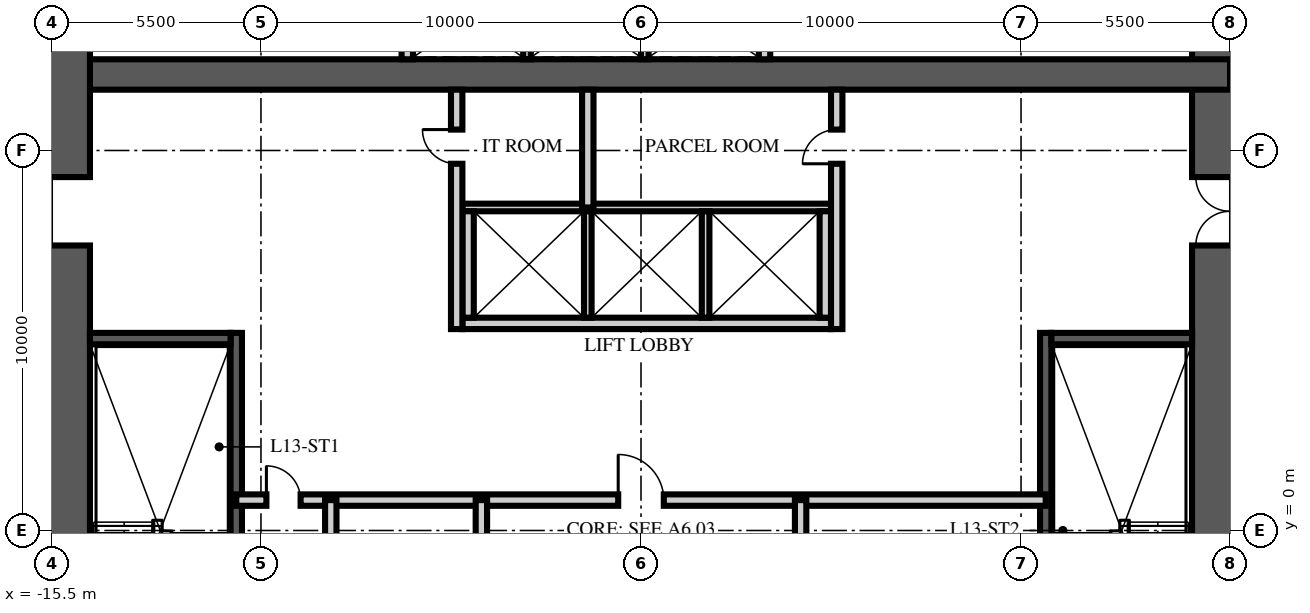
"""IFC4 building model, lengths in metres.
Left out: names, types, materials, properties, quantities, classifications, styles, units other than length and angle.
Written with IfcOpenShell. Run it as: python <this file> out.ifc"""

import sys

from ifc_helpers import new_model, si_unit, direction, frame, frame_2d, origin, place, context, subcontext, project, spatial, rectangle, extrude, element, fill, save


model = new_model("IFC4")
c1 = context("Model", 3, precision=1e-05, world=origin(), true_north=direction((0.0, 1.0)))
c2 = subcontext(c1, "Body", "Model", "MODEL_VIEW")
j1 = project(units=[si_unit("LENGTHUNIT", "METRE"), si_unit("PLANEANGLEUNIT", "RADIAN")], contexts=[c1])
p1 = place(None, origin())
s1 = spatial("IfcSite", under=j1, at=p1, CompositionType="ELEMENT")
p2 = place(p1, origin())
s2 = spatial("IfcBuilding", under=s1, at=p2, CompositionType="ELEMENT")
p3 = place(p2, frame((0.0, 0.0, 54.75)))
s3 = spatial("IfcBuildingStorey", under=s2, at=p3, CompositionType="ELEMENT", Elevation=54.75)
p4 = place(p3, frame((15.5, -15.5, -0.25), z_axis=(0.0, 0.0, 1.0), x_axis=(0.0, 1.0, 0.0)))
e1 = element("IfcWall", 1, at=p4, inside=s3, PredefinedType="SHEAR", context=c2, shape_type="SweptSolid", body=[
    extrude(rectangle(XDim=31.0, YDim=2.0, at=frame_2d((15.5, 0.0))), origin(), (0.0, 0.0, 1.0), 3.75),
])
p5 = place(p4, frame((6.5, 0.0, 0.25)))
e2 = element("IfcOpeningElement", 2, at=p5, cuts=e1, PredefinedType="OPENING", context=c2, shape_type="SweptSolid", body=[
    extrude(rectangle(XDim=1.2, YDim=2.1, at=frame_2d((0.6, 1.05))), frame((0.0, 1.01, 0.0), z_axis=(0.0, -1.0, 0.0), x_axis=(1.0, 0.0, 0.0)), (0.0, 0.0, 1.0), 2.02),
])
p6 = place(p4, frame((23.0, 0.0, 0.25)))
e3 = element("IfcOpeningElement", 3, at=p6, cuts=e1, PredefinedType="OPENING", context=c2, shape_type="SweptSolid", body=[
    extrude(rectangle(XDim=1.8, YDim=2.1, at=frame_2d((0.9, 1.05))), frame((0.0, 1.01, 0.0), z_axis=(0.0, -1.0, 0.0), x_axis=(1.0, 0.0, 0.0)), (0.0, 0.0, 1.0), 2.02),
])
p7 = place(p3, frame((-15.5, 12.0, -0.25), z_axis=(0.0, 0.0, 1.0), x_axis=(1.0, 0.0, 0.0)))
e4 = element("IfcWall", 4, at=p7, inside=s3, PredefinedType="SHEAR", context=c2, shape_type="SweptSolid", body=[
    extrude(rectangle(XDim=31.0, YDim=0.8, at=frame_2d((15.5, 0.0))), origin(), (0.0, 0.0, 1.0), 3.75),
])
p8 = place(p3, frame((-15.5, -15.5, -0.25), z_axis=(0.0, 0.0, 1.0), x_axis=(0.0, 1.0, 0.0)))
e5 = element("IfcWall", 5, at=p8, inside=s3, PredefinedType="SHEAR", context=c2, shape_type="SweptSolid", body=[
    extrude(rectangle(XDim=31.0, YDim=2.0, at=frame_2d((15.5, 0.0))), origin(), (0.0, 0.0, 1.0), 3.75),
])
p9 = place(p8, frame((6.5, 0.0, 0.25)))
e6 = element("IfcOpeningElement", 6, at=p9, cuts=e5, PredefinedType="OPENING", context=c2, shape_type="SweptSolid", body=[
    extrude(rectangle(XDim=1.2, YDim=2.1, at=frame_2d((0.6, 1.05))), frame((0.0, 1.01, 0.0), z_axis=(0.0, -1.0, 0.0), x_axis=(1.0, 0.0, 0.0)), (0.0, 0.0, 1.0), 2.02),
])
p10 = place(p8, frame((23.0, 0.0, 0.25)))
e7 = element("IfcOpeningElement", 7, at=p10, cuts=e5, PredefinedType="OPENING", context=c2, shape_type="SweptSolid", body=[
    extrude(rectangle(XDim=1.8, YDim=2.1, at=frame_2d((0.9, 1.05))), frame((0.0, 1.01, 0.0), z_axis=(0.0, -1.0, 0.0), x_axis=(1.0, 0.0, 0.0)), (0.0, 0.0, 1.0), 2.02),
])
p11 = place(p3, frame((-10.65, -4.9, 0.0), z_axis=(0.0, 0.0, 1.0), x_axis=(0.0, 1.0, 0.0)))
e8 = element("IfcWall", 8, at=p11, inside=s3, PredefinedType="SOLIDWALL", context=c2, shape_type="SweptSolid", body=[
    extrude(rectangle(XDim=10.1, YDim=0.3, at=frame_2d((5.05, 0.0))), origin(), (0.0, 0.0, 1.0), 3.5),
])
p12 = place(p3, frame((-14.5, 5.05, 0.0), z_axis=(0.0, 0.0, 1.0), x_axis=(1.0, 0.0, 0.0)))
e9 = element("IfcWall", 9, at=p12, inside=s3, PredefinedType="SOLIDWALL", context=c2, shape_type="SweptSolid", body=[
    extrude(rectangle(XDim=3.7, YDim=0.3, at=frame_2d((1.85, 0.0))), origin(), (0.0, 0.0, 1.0), 3.5),
])
p13 = place(p3, frame((10.65, -4.9, 0.0), z_axis=(0.0, 0.0, 1.0), x_axis=(0.0, 1.0, 0.0)))
e10 = element("IfcWall", 10, at=p13, inside=s3, PredefinedType="SOLIDWALL", context=c2, shape_type="SweptSolid", body=[
    extrude(rectangle(XDim=10.1, YDim=0.3, at=frame_2d((5.05, 0.0))), origin(), (0.0, 0.0, 1.0), 3.5),
])
p14 = place(p3, frame((14.5, 5.05, 0.0), z_axis=(0.0, 0.0, 1.0), x_axis=(-1.0, 0.0, 0.0)))
e11 = element("IfcWall", 11, at=p14, inside=s3, PredefinedType="SOLIDWALL", context=c2, shape_type="SweptSolid", body=[
    extrude(rectangle(XDim=3.7, YDim=0.3, at=frame_2d((1.85, 0.0))), origin(), (0.0, 0.0, 1.0), 3.5),
])
p15 = place(p3, frame((-4.7, 5.45, 0.0), z_axis=(0.0, 0.0, 1.0), x_axis=(1.0, 0.0, 0.0)))
e12 = element("IfcWall", 12, at=p15, inside=s3, PredefinedType="PARTITIONING", context=c2, shape_type="SweptSolid", body=[
    extrude(rectangle(XDim=9.7, YDim=0.3, at=frame_2d((4.85, 0.0))), origin(), (0.0, 0.0, 1.0), 3.5),
])
p16 = place(p3, frame((-4.7, 8.5, 0.0), z_axis=(0.0, 0.0, 1.0), x_axis=(1.0, 0.0, 0.0)))
e13 = element("IfcWall", 13, at=p16, inside=s3, PredefinedType="PARTITIONING", context=c2, shape_type="SweptSolid", body=[
    extrude(rectangle(XDim=9.7, YDim=0.2, at=frame_2d((4.85, 0.0))), origin(), (0.0, 0.0, 1.0), 3.5),
])
for number, where, z_axis, x_axis in (
    (14, (-4.55, 5.6, 0.0), (0.0, 0.0, 1.0), (0.0, 1.0, 0.0)),
    (15, (4.85, 5.6, 0.0), (0.0, 0.0, 1.0), (0.0, 1.0, 0.0)),
):
    element("IfcWall", number, at=place(p3, frame(where, z_axis=z_axis, x_axis=x_axis)), inside=s3, PredefinedType="PARTITIONING", context=c2, shape_type="SweptSolid", body=[
        extrude(rectangle(XDim=2.8, YDim=0.3, at=frame_2d((1.4, 0.0))), origin(), (0.0, 0.0, 1.0), 3.5),
    ])
for number, where, z_axis, x_axis in (
    (16, (-1.4, 5.6, 0.0), (0.0, 0.0, 1.0), (0.0, 1.0, 0.0)),
    (17, (1.7, 5.6, 0.0), (0.0, 0.0, 1.0), (0.0, 1.0, 0.0)),
):
    element("IfcWall", number, at=place(p3, frame(where, z_axis=z_axis, x_axis=x_axis)), inside=s3, PredefinedType="PARTITIONING", context=c2, shape_type="SweptSolid", body=[
        extrude(rectangle(XDim=2.8, YDim=0.2, at=frame_2d((1.4, 0.0))), origin(), (0.0, 0.0, 1.0), 3.5),
    ])
for number, where, z_axis, x_axis in (
    (18, (-6.15, 12.4, 0.0), (0.0, 0.0, 1.0), (0.0, 1.0, 0.0)),
    (19, (3.25, 12.4, 0.0), (0.0, 0.0, 1.0), (0.0, 1.0, 0.0)),
):
    element("IfcWall", number, at=place(p3, frame(where, z_axis=z_axis, x_axis=x_axis)), inside=s3, PredefinedType="PARTITIONING", context=c2, shape_type="SweptSolid", body=[
        extrude(rectangle(XDim=2.1, YDim=0.3, at=frame_2d((1.05, 0.0))), origin(), (0.0, 0.0, 1.0), 3.5),
    ])
for number, where, z_axis, x_axis in (
    (20, (-3.0, 12.4, 0.0), (0.0, 0.0, 1.0), (0.0, 1.0, 0.0)),
    (21, (0.1, 12.4, 0.0), (0.0, 0.0, 1.0), (0.0, 1.0, 0.0)),
):
    element("IfcWall", number, at=place(p3, frame(where, z_axis=z_axis, x_axis=x_axis)), inside=s3, PredefinedType="PARTITIONING", context=c2, shape_type="SweptSolid", body=[
        extrude(rectangle(XDim=2.1, YDim=0.2, at=frame_2d((1.05, 0.0))), origin(), (0.0, 0.0, 1.0), 3.5),
    ])
p17 = place(p3, frame((-10.65, 0.8, 0.0), z_axis=(0.0, 0.0, 1.0), x_axis=(1.0, 0.0, 0.0)))
e22 = element("IfcWall", 22, at=p17, inside=s3, PredefinedType="PARTITIONING", context=c2, shape_type="SweptSolid", body=[
    extrude(rectangle(XDim=21.3, YDim=0.3, at=frame_2d((10.65, 0.0))), origin(), (0.0, 0.0, 1.0), 3.5),
])
p18 = place(p17, frame((10.05, 0.0, 0.0)))
e23 = element("IfcOpeningElement", 23, at=p18, cuts=e22, PredefinedType="OPENING", context=c2, shape_type="SweptSolid", body=[
    extrude(rectangle(XDim=1.2, YDim=2.1, at=frame_2d((0.6, 1.05))), frame((0.0, 0.16, 0.0), z_axis=(0.0, -1.0, 0.0), x_axis=(1.0, 0.0, 0.0)), (0.0, 0.0, 1.0), 0.32),
])
p19 = place(p17, frame((0.793, 0.0, 0.0)))
e24 = element("IfcOpeningElement", 24, at=p19, cuts=e22, PredefinedType="OPENING", context=c2, shape_type="SweptSolid", body=[
    extrude(rectangle(XDim=0.9, YDim=2.1, at=frame_2d((0.45, 1.05))), frame((0.0, 0.16, 0.0), z_axis=(0.0, -1.0, 0.0), x_axis=(1.0, 0.0, 0.0)), (0.0, 0.0, 1.0), 0.32),
])
p20 = place(p3, frame((-4.2, -6.65, 0.0), z_axis=(0.0, 0.0, 1.0), x_axis=(0.0, 1.0, 0.0)))
e25 = element("IfcWall", 25, at=p20, inside=s3, PredefinedType="PARTITIONING", context=c2, shape_type="SweptSolid", body=[
    extrude(rectangle(XDim=7.45, YDim=0.3, at=frame_2d((3.725, 0.0))), origin(), (0.0, 0.0, 1.0), 3.5),
])
p21 = place(p20, frame((3.275, 0.0, 0.0)))
e26 = element("IfcOpeningElement", 26, at=p21, cuts=e25, PredefinedType="OPENING", context=c2, shape_type="SweptSolid", body=[
    extrude(rectangle(XDim=0.9, YDim=2.1, at=frame_2d((0.45, 1.05))), frame((0.0, 0.16, 0.0), z_axis=(0.0, -1.0, 0.0), x_axis=(1.0, 0.0, 0.0)), (0.0, 0.0, 1.0), 0.32),
])
p22 = place(p3, frame((4.2, -6.65, 0.0), z_axis=(0.0, 0.0, 1.0), x_axis=(0.0, 1.0, 0.0)))
e27 = element("IfcWall", 27, at=p22, inside=s3, PredefinedType="PARTITIONING", context=c2, shape_type="SweptSolid", body=[
    extrude(rectangle(XDim=7.45, YDim=0.3, at=frame_2d((3.725, 0.0))), origin(), (0.0, 0.0, 1.0), 3.5),
])
p23 = place(p22, frame((0.866, 0.0, 0.0)))
e28 = element("IfcOpeningElement", 28, at=p23, cuts=e27, PredefinedType="OPENING", context=c2, shape_type="SweptSolid", body=[
    extrude(rectangle(XDim=0.9, YDim=2.1, at=frame_2d((0.45, 1.05))), frame((0.0, 0.16, 0.0), z_axis=(0.0, -1.0, 0.0), x_axis=(1.0, 0.0, 0.0)), (0.0, 0.0, 1.0), 0.32),
])
p24 = place(p22, frame((4.591, 0.0, 0.0)))
e29 = element("IfcOpeningElement", 29, at=p24, cuts=e27, PredefinedType="OPENING", context=c2, shape_type="SweptSolid", body=[
    extrude(rectangle(XDim=0.9, YDim=2.1, at=frame_2d((0.45, 1.05))), frame((0.0, 0.16, 0.0), z_axis=(0.0, -1.0, 0.0), x_axis=(1.0, 0.0, 0.0)), (0.0, 0.0, 1.0), 0.32),
])
p25 = place(p3, frame((-8.163, -6.65, 0.0), z_axis=(0.0, 0.0, 1.0), x_axis=(0.0, 1.0, 0.0)))
e30 = element("IfcWall", 30, at=p25, inside=s3, PredefinedType="PARTITIONING", context=c2, shape_type="SweptSolid", body=[
    extrude(rectangle(XDim=7.45, YDim=0.3, at=frame_2d((3.725, 0.0))), origin(), (0.0, 0.0, 1.0), 3.5),
])
p26 = place(p3, frame((-4.85, 5.3, 0.0), z_axis=(0.0, 0.0, 1.0), x_axis=(0.0, 1.0, 0.0)))
e31 = element("IfcWall", 31, at=p26, inside=s3, PredefinedType="PARTITIONING", context=c2, shape_type="SweptSolid", body=[
    extrude(rectangle(XDim=6.3, YDim=0.3, at=frame_2d((3.15, 0.0))), origin(), (0.0, 0.0, 1.0), 3.5),
])
p27 = place(p26, frame((4.35, 0.0, 0.0)))
e32 = element("IfcOpeningElement", 32, at=p27, cuts=e31, PredefinedType="OPENING", context=c2, shape_type="SweptSolid", body=[
    extrude(rectangle(XDim=0.9, YDim=2.1, at=frame_2d((0.45, 1.05))), frame((0.0, 0.16, 0.0), z_axis=(0.0, -1.0, 0.0), x_axis=(1.0, 0.0, 0.0)), (0.0, 0.0, 1.0), 0.32),
])
p28 = place(p3, frame((5.15, 5.3, 0.0), z_axis=(0.0, 0.0, 1.0), x_axis=(0.0, 1.0, 0.0)))
e33 = element("IfcWall", 33, at=p28, inside=s3, PredefinedType="PARTITIONING", context=c2, shape_type="SweptSolid", body=[
    extrude(rectangle(XDim=6.3, YDim=0.3, at=frame_2d((3.15, 0.0))), origin(), (0.0, 0.0, 1.0), 3.5),
])
p29 = place(p28, frame((4.35, 0.0, 0.0)))
e34 = element("IfcOpeningElement", 34, at=p29, cuts=e33, PredefinedType="OPENING", context=c2, shape_type="SweptSolid", body=[
    extrude(rectangle(XDim=0.9, YDim=2.1, at=frame_2d((0.45, 1.05))), frame((0.0, 0.16, 0.0), z_axis=(0.0, -1.0, 0.0), x_axis=(1.0, 0.0, 0.0)), (0.0, 0.0, 1.0), 0.32),
])
p30 = place(p3, frame((-1.4, 8.5, 0.0), z_axis=(0.0, 0.0, 1.0), x_axis=(0.0, 1.0, 0.0)))
e35 = element("IfcWall", 35, at=p30, inside=s3, PredefinedType="PARTITIONING", context=c2, shape_type="SweptSolid", body=[
    extrude(rectangle(XDim=3.1, YDim=0.3, at=frame_2d((1.55, 0.0))), origin(), (0.0, 0.0, 1.0), 3.5),
])
p31 = place(p10, origin())
e36 = element("IfcDoor", 36, at=p31, inside=s3, OperationType="DOUBLE_DOOR_SINGLE_SWING", PredefinedType="DOOR", context=c2, shape_type="SweptSolid", body=[
    extrude(rectangle(XDim=1.8, YDim=2.1, at=frame_2d((0.9, 1.05))), frame((0.0, 0.025, 0.0), z_axis=(0.0, -1.0, 0.0), x_axis=(1.0, 0.0, 0.0)), (0.0, 0.0, 1.0), 0.05),
])
fill(e7, e36)
p32 = place(p6, origin())
e37 = element("IfcDoor", 37, at=p32, inside=s3, OperationType="DOUBLE_DOOR_SINGLE_SWING", PredefinedType="DOOR", context=c2, shape_type="SweptSolid", body=[
    extrude(rectangle(XDim=1.8, YDim=2.1, at=frame_2d((0.9, 1.05))), frame((0.0, 0.025, 0.0), z_axis=(0.0, -1.0, 0.0), x_axis=(1.0, 0.0, 0.0)), (0.0, 0.0, 1.0), 0.05),
])
fill(e3, e37)
p33 = place(p18, origin())
e38 = element("IfcDoor", 38, at=p33, inside=s3, OperationType="SINGLE_SWING_LEFT", PredefinedType="DOOR", context=c2, shape_type="SweptSolid", body=[
    extrude(rectangle(XDim=1.2, YDim=2.1, at=frame_2d((0.6, 1.05))), frame((0.0, 0.025, 0.0), z_axis=(0.0, -1.0, 0.0), x_axis=(1.0, 0.0, 0.0)), (0.0, 0.0, 1.0), 0.05),
])
fill(e23, e38)
p34 = place(p19, origin())
e39 = element("IfcDoor", 39, at=p34, inside=s3, OperationType="SINGLE_SWING_LEFT", PredefinedType="DOOR", context=c2, shape_type="SweptSolid", body=[
    extrude(rectangle(XDim=0.9, YDim=2.1, at=frame_2d((0.45, 1.05))), frame((0.0, 0.025, 0.0), z_axis=(0.0, -1.0, 0.0), x_axis=(1.0, 0.0, 0.0)), (0.0, 0.0, 1.0), 0.05),
])
fill(e24, e39)
p35 = place(p27, origin())
e40 = element("IfcDoor", 40, at=p35, inside=s3, OperationType="SINGLE_SWING_RIGHT", PredefinedType="DOOR", context=c2, shape_type="SweptSolid", body=[
    extrude(rectangle(XDim=0.9, YDim=2.1, at=frame_2d((0.45, 1.05))), frame((0.0, 0.025, 0.0), z_axis=(0.0, -1.0, 0.0), x_axis=(1.0, 0.0, 0.0)), (0.0, 0.0, 1.0), 0.05),
])
fill(e32, e40)
p36 = place(p29, origin())
e41 = element("IfcDoor", 41, at=p36, inside=s3, OperationType="SINGLE_SWING_LEFT", PredefinedType="DOOR", context=c2, shape_type="SweptSolid", body=[
    extrude(rectangle(XDim=0.9, YDim=2.1, at=frame_2d((0.45, 1.05))), frame((0.0, 0.025, 0.0), z_axis=(0.0, -1.0, 0.0), x_axis=(1.0, 0.0, 0.0)), (0.0, 0.0, 1.0), 0.05),
])
fill(e34, e41)
save(model, sys.argv[1])
